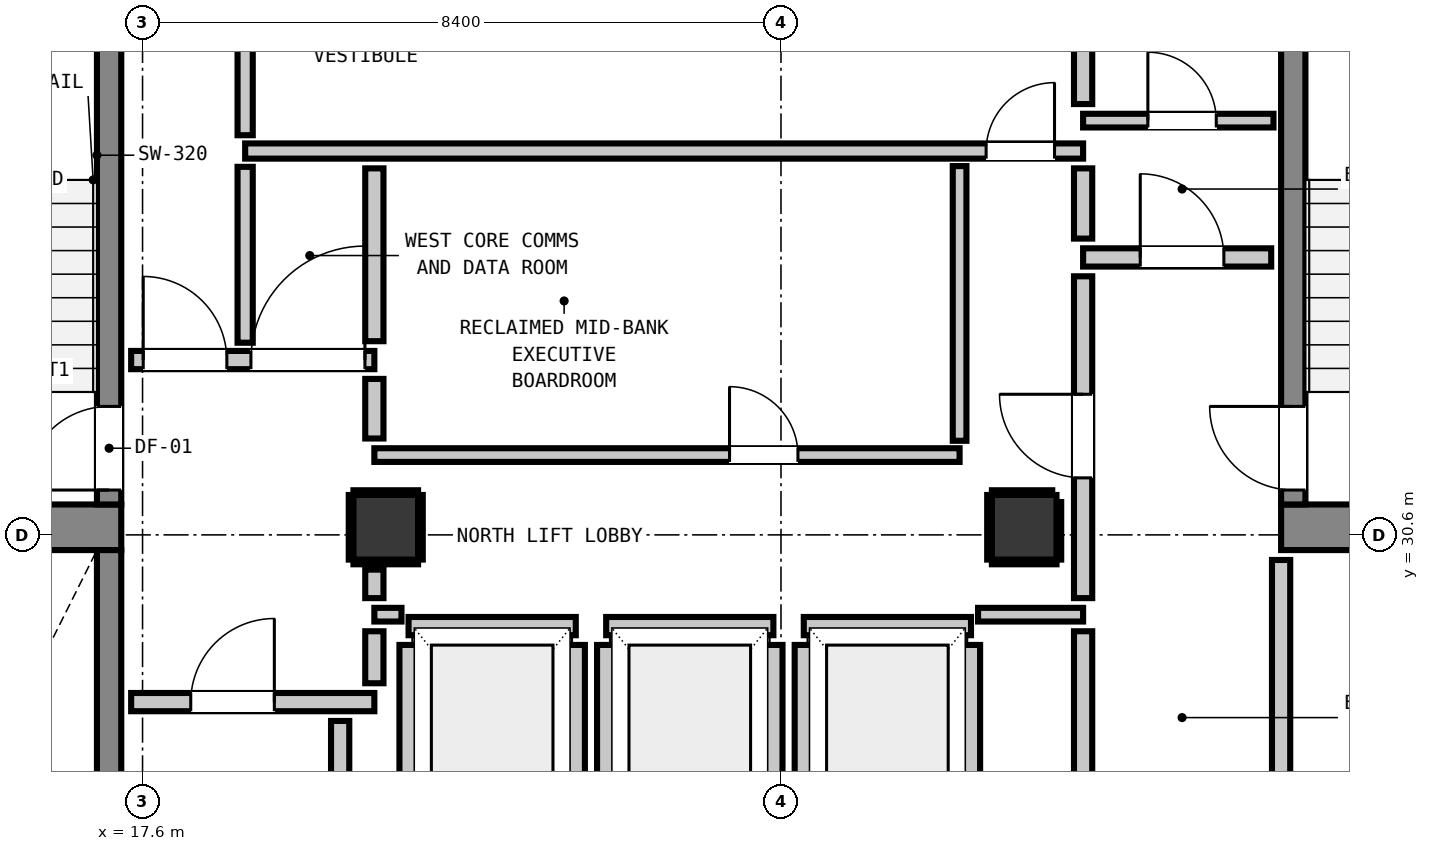
"""IFC4 building model, lengths in metres.
Left out: names, types, materials, properties, quantities, classifications, styles, units other than length and angle.
Written with IfcOpenShell. Run it as: python <this file> out.ifc"""

import sys

from ifc_helpers import new_model, si_unit, direction, frame, frame_2d, origin, origin_2d, place, context, subcontext, project, spatial, rectangle, extrude, element, fill, save


model = new_model("IFC4")
c1 = context("Model", 3, precision=1e-05, world=origin(), true_north=direction((0.0, 1.0)))
c2 = subcontext(c1, "Body", "Model", "MODEL_VIEW")
j1 = project(units=[si_unit("LENGTHUNIT", "METRE"), si_unit("PLANEANGLEUNIT", "RADIAN")], contexts=[c1])
p1 = place(None, origin())
s1 = spatial("IfcSite", under=j1, at=p1, CompositionType="ELEMENT")
p2 = place(p1, origin())
s2 = spatial("IfcBuilding", under=s1, at=p2, CompositionType="ELEMENT")
p3 = place(p2, frame((0.0, 0.0, 231.28)))
s3 = spatial("IfcBuildingStorey", under=s2, at=p3, CompositionType="ELEMENT", Elevation=231.28)
for number, where, z_axis, x_axis in (
    (1, (13.78, 30.7, 0.0), (0.0, 0.0, 1.0), (1.0, 0.0, 0.0)),
    (2, (32.58, 30.7, 0.0), (0.0, 0.0, 1.0), (1.0, 0.0, 0.0)),
):
    element("IfcWall", number, at=place(p3, frame(where, z_axis=z_axis, x_axis=x_axis)), inside=s3, PredefinedType="SHEAR", context=c2, shape_type="SweptSolid", body=[
        extrude(rectangle(XDim=3.54, YDim=0.6, at=frame_2d((1.77, 0.0))), origin(), (0.0, 0.0, 1.0), 3.32),
    ])
p4 = place(p3, frame((17.16, 31.0, 0.0), z_axis=(0.0, 0.0, 1.0), x_axis=(0.0, 1.0, 0.0)))
e3 = element("IfcWall", 3, at=p4, inside=s3, PredefinedType="SHEAR", context=c2, shape_type="SweptSolid", body=[
    extrude(rectangle(XDim=7.8, YDim=0.32, at=frame_2d((3.9, 0.0))), origin(), (0.0, 0.0, 1.0), 3.32),
])
p5 = place(p4, frame((0.19, 0.0, 0.0)))
e4 = element("IfcOpeningElement", 4, at=p5, cuts=e3, PredefinedType="OPENING", context=c2, shape_type="SweptSolid", body=[
    extrude(rectangle(XDim=1.1, YDim=2.15, at=frame_2d((0.55, 1.075))), frame((0.0, 0.17, 0.0), z_axis=(0.0, -1.0, 0.0), x_axis=(1.0, 0.0, 0.0)), (0.0, 0.0, 1.0), 0.34),
])
p6 = place(p3, frame((17.16, 22.4, 0.0), z_axis=(0.0, 0.0, 1.0), x_axis=(0.0, 1.0, 0.0)))
e5 = element("IfcWall", 5, at=p6, inside=s3, PredefinedType="SHEAR", context=c2, shape_type="SweptSolid", body=[
    extrude(rectangle(XDim=8.0, YDim=0.32, at=frame_2d((4.0, 0.0))), origin(), (0.0, 0.0, 1.0), 3.32),
])
p7 = place(p6, frame((0.39, 0.0, 0.0)))
e6 = element("IfcOpeningElement", 6, at=p7, cuts=e5, PredefinedType="OPENING", context=c2, shape_type="SweptSolid", body=[
    extrude(rectangle(XDim=1.1, YDim=2.15, at=frame_2d((0.55, 1.075))), frame((0.0, 0.17, 0.0), z_axis=(0.0, -1.0, 0.0), x_axis=(1.0, 0.0, 0.0)), (0.0, 0.0, 1.0), 0.34),
])
p8 = place(p3, frame((32.74, 31.0, 0.0), z_axis=(0.0, 0.0, 1.0), x_axis=(0.0, 1.0, 0.0)))
e7 = element("IfcWall", 7, at=p8, inside=s3, PredefinedType="SHEAR", context=c2, shape_type="SweptSolid", body=[
    extrude(rectangle(XDim=7.8, YDim=0.32, at=frame_2d((3.9, 0.0))), origin(), (0.0, 0.0, 1.0), 3.32),
])
p9 = place(p8, frame((0.19, 0.0, 0.0)))
e8 = element("IfcOpeningElement", 8, at=p9, cuts=e7, PredefinedType="OPENING", context=c2, shape_type="SweptSolid", body=[
    extrude(rectangle(XDim=1.1, YDim=2.15, at=frame_2d((0.55, 1.075))), frame((0.0, 0.17, 0.0), z_axis=(0.0, -1.0, 0.0), x_axis=(1.0, 0.0, 0.0)), (0.0, 0.0, 1.0), 0.34),
])
for number, where, z_axis, x_axis in (
    (9, (20.8, 30.7, 0.0), (0.0, 0.0, 1.0), (1.0, 0.0, 0.0)),
    (10, (29.2, 30.7, 0.0), (0.0, 0.0, 1.0), (1.0, 0.0, 0.0)),
):
    element("IfcColumn", number, at=place(p3, frame(where, z_axis=z_axis, x_axis=x_axis)), inside=s3, PredefinedType="COLUMN", context=c2, shape_type="SweptSolid", body=[
        extrude(rectangle(XDim=0.85, YDim=0.85, at=origin_2d()), origin(), (0.0, 0.0, 1.0), 3.32),
    ])
p10 = place(p3, frame((21.1, 29.4, 0.0), z_axis=(0.0, 0.0, 1.0), x_axis=(1.0, 0.0, 0.0)))
e11 = element("IfcWall", 11, at=p10, inside=s3, PredefinedType="PARTITIONING", context=c2, shape_type="SweptSolid", body=[
    extrude(rectangle(XDim=2.2, YDim=0.24, at=frame_2d((1.1, 0.0))), origin(), (0.0, 0.0, 1.0), 3.1),
])
p11 = place(p3, frame((21.1, 27.048, 0.0), z_axis=(0.0, 0.0, 1.0), x_axis=(0.0, 1.0, 0.0)))
e12 = element("IfcWall", 12, at=p11, inside=s3, PredefinedType="PARTITIONING", context=c2, shape_type="SweptSolid", body=[
    extrude(rectangle(XDim=2.104, YDim=0.24, at=frame_2d((1.052, 0.0))), origin(), (0.0, 0.0, 1.0), 2.335),
])
p12 = place(p3, frame((23.3, 27.048, 0.0), z_axis=(0.0, 0.0, 1.0), x_axis=(0.0, 1.0, 0.0)))
e13 = element("IfcWall", 13, at=p12, inside=s3, PredefinedType="PARTITIONING", context=c2, shape_type="SweptSolid", body=[
    extrude(rectangle(XDim=2.104, YDim=0.24, at=frame_2d((1.052, 0.0))), origin(), (0.0, 0.0, 1.0), 3.1),
])
p13 = place(p3, frame((23.7, 29.4, 0.0), z_axis=(0.0, 0.0, 1.0), x_axis=(1.0, 0.0, 0.0)))
e14 = element("IfcWall", 14, at=p13, inside=s3, PredefinedType="PARTITIONING", context=c2, shape_type="SweptSolid", body=[
    extrude(rectangle(XDim=2.2, YDim=0.24, at=frame_2d((1.1, 0.0))), origin(), (0.0, 0.0, 1.0), 3.1),
])
for number, where, z_axis, x_axis in (
    (15, (23.7, 27.048, 0.0), (0.0, 0.0, 1.0), (0.0, 1.0, 0.0)),
    (16, (25.9, 27.048, 0.0), (0.0, 0.0, 1.0), (0.0, 1.0, 0.0)),
):
    element("IfcWall", number, at=place(p3, frame(where, z_axis=z_axis, x_axis=x_axis)), inside=s3, PredefinedType="PARTITIONING", context=c2, shape_type="SweptSolid", body=[
        extrude(rectangle(XDim=2.104, YDim=0.24, at=frame_2d((1.052, 0.0))), origin(), (0.0, 0.0, 1.0), 3.1),
    ])
p14 = place(p3, frame((26.3, 29.4, 0.0), z_axis=(0.0, 0.0, 1.0), x_axis=(1.0, 0.0, 0.0)))
e17 = element("IfcWall", 17, at=p14, inside=s3, PredefinedType="PARTITIONING", context=c2, shape_type="SweptSolid", body=[
    extrude(rectangle(XDim=2.2, YDim=0.24, at=frame_2d((1.1, 0.0))), origin(), (0.0, 0.0, 1.0), 3.1),
])
p15 = place(p3, frame((26.3, 27.048, 0.0), z_axis=(0.0, 0.0, 1.0), x_axis=(0.0, 1.0, 0.0)))
e18 = element("IfcWall", 18, at=p15, inside=s3, PredefinedType="PARTITIONING", context=c2, shape_type="SweptSolid", body=[
    extrude(rectangle(XDim=2.104, YDim=0.24, at=frame_2d((1.052, 0.0))), origin(), (0.0, 0.0, 1.0), 3.1),
])
p16 = place(p3, frame((28.5, 27.33, 0.0), z_axis=(0.0, 0.0, 1.0), x_axis=(0.0, 1.0, 0.0)))
e19 = element("IfcWall", 19, at=p16, inside=s3, PredefinedType="PARTITIONING", context=c2, shape_type="SweptSolid", body=[
    extrude(rectangle(XDim=1.822, YDim=0.24, at=frame_2d((0.911, 0.0))), origin(), (0.0, 0.0, 1.0), 3.1),
])
p17 = place(p3, frame((17.45, 28.4, 0.0), z_axis=(0.0, 0.0, 1.0), x_axis=(1.0, 0.0, 0.0)))
e20 = element("IfcWall", 20, at=p17, inside=s3, PredefinedType="PARTITIONING", context=c2, shape_type="SweptSolid", body=[
    extrude(rectangle(XDim=3.2, YDim=0.24, at=frame_2d((1.6, 0.0))), origin(), (0.0, 0.0, 1.0), 3.1),
])
p18 = place(p17, frame((0.784, 0.0, 0.0)))
e21 = element("IfcOpeningElement", 21, at=p18, cuts=e20, PredefinedType="OPENING", context=c2, shape_type="SweptSolid", body=[
    extrude(rectangle(XDim=1.1, YDim=2.15, at=frame_2d((0.55, 1.075))), frame((0.0, 0.13, 0.0), z_axis=(0.0, -1.0, 0.0), x_axis=(1.0, 0.0, 0.0)), (0.0, 0.0, 1.0), 0.26),
])
p19 = place(p3, frame((17.45, 32.9, 0.0), z_axis=(0.0, 0.0, 1.0), x_axis=(1.0, 0.0, 0.0)))
e22 = element("IfcWall", 22, at=p19, inside=s3, PredefinedType="PARTITIONING", context=c2, shape_type="SweptSolid", body=[
    extrude(rectangle(XDim=3.2, YDim=0.24, at=frame_2d((1.6, 0.0))), origin(), (0.0, 0.0, 1.0), 3.1),
])
p20 = place(p19, frame((0.159, 0.0, 0.0)))
e23 = element("IfcOpeningElement", 23, at=p20, cuts=e22, PredefinedType="OPENING", context=c2, shape_type="SweptSolid", body=[
    extrude(rectangle(XDim=1.1, YDim=2.15, at=frame_2d((0.55, 1.075))), frame((0.0, 0.13, 0.0), z_axis=(0.0, -1.0, 0.0), x_axis=(1.0, 0.0, 0.0)), (0.0, 0.0, 1.0), 0.26),
])
p21 = place(p19, frame((1.576, 0.0, 0.0)))
e24 = element("IfcOpeningElement", 24, at=p21, cuts=e22, PredefinedType="OPENING", context=c2, shape_type="SweptSolid", body=[
    extrude(rectangle(XDim=1.5, YDim=2.15, at=frame_2d((0.75, 1.075))), frame((0.0, 0.13, 0.0), z_axis=(0.0, -1.0, 0.0), x_axis=(1.0, 0.0, 0.0)), (0.0, 0.0, 1.0), 0.26),
])
p22 = place(p3, frame((29.975, 34.25, 0.0), z_axis=(0.0, 0.0, 1.0), x_axis=(1.0, 0.0, 0.0)))
e25 = element("IfcWall", 25, at=p22, inside=s3, PredefinedType="PARTITIONING", context=c2, shape_type="SweptSolid", body=[
    extrude(rectangle(XDim=2.475, YDim=0.24, at=frame_2d((1.237, 0.0))), origin(), (0.0, 0.0, 1.0), 3.1),
])
p23 = place(p22, frame((0.752, 0.0, 0.0)))
e26 = element("IfcOpeningElement", 26, at=p23, cuts=e25, PredefinedType="OPENING", context=c2, shape_type="SweptSolid", body=[
    extrude(rectangle(XDim=1.1, YDim=2.15, at=frame_2d((0.55, 1.075))), frame((0.0, 0.13, 0.0), z_axis=(0.0, -1.0, 0.0), x_axis=(1.0, 0.0, 0.0)), (0.0, 0.0, 1.0), 0.26),
])
p24 = place(p3, frame((18.95, 35.65, 0.0), z_axis=(0.0, 0.0, 1.0), x_axis=(1.0, 0.0, 0.0)))
e27 = element("IfcWall", 27, at=p24, inside=s3, PredefinedType="PARTITIONING", context=c2, shape_type="SweptSolid", body=[
    extrude(rectangle(XDim=11.025, YDim=0.2, at=frame_2d((5.513, 0.0))), origin(), (0.0, 0.0, 1.0), 3.1),
])
p25 = place(p24, frame((9.749, 0.0, 0.0)))
e28 = element("IfcOpeningElement", 28, at=p25, cuts=e27, PredefinedType="OPENING", context=c2, shape_type="SweptSolid", body=[
    extrude(rectangle(XDim=0.9, YDim=2.1, at=frame_2d((0.45, 1.05))), frame((0.0, 0.11, 0.0), z_axis=(0.0, -1.0, 0.0), x_axis=(1.0, 0.0, 0.0)), (0.0, 0.0, 1.0), 0.22),
])
p26 = place(p3, frame((20.65, 29.55, 0.0), z_axis=(0.0, 0.0, 1.0), x_axis=(1.0, 0.0, 0.0)))
e29 = element("IfcWall", 29, at=p26, inside=s3, PredefinedType="PARTITIONING", context=c2, shape_type="SweptSolid", body=[
    extrude(rectangle(XDim=0.357, YDim=0.18, at=frame_2d((0.179, 0.0))), origin(), (0.0, 0.0, 1.0), 3.1),
])
p27 = place(p3, frame((28.593, 29.55, 0.0), z_axis=(0.0, 0.0, 1.0), x_axis=(1.0, 0.0, 0.0)))
e30 = element("IfcWall", 30, at=p27, inside=s3, PredefinedType="PARTITIONING", context=c2, shape_type="SweptSolid", body=[
    extrude(rectangle(XDim=1.382, YDim=0.18, at=frame_2d((0.691, 0.0))), origin(), (0.0, 0.0, 1.0), 3.1),
])
p28 = place(p3, frame((20.65, 31.65, 0.0), z_axis=(0.0, 0.0, 1.0), x_axis=(1.0, 0.0, 0.0)))
e31 = element("IfcWall", 31, at=p28, inside=s3, PredefinedType="PARTITIONING", context=c2, shape_type="SweptSolid", body=[
    extrude(rectangle(XDim=7.7, YDim=0.18, at=frame_2d((3.85, 0.0))), origin(), (0.0, 0.0, 1.0), 3.1),
])
p29 = place(p28, frame((4.673, 0.0, 0.0)))
e32 = element("IfcOpeningElement", 32, at=p29, cuts=e31, PredefinedType="OPENING", context=c2, shape_type="SweptSolid", body=[
    extrude(rectangle(XDim=0.9, YDim=2.1, at=frame_2d((0.45, 1.05))), frame((0.0, 0.1, 0.0), z_axis=(0.0, -1.0, 0.0), x_axis=(1.0, 0.0, 0.0)), (0.0, 0.0, 1.0), 0.2),
])
p30 = place(p3, frame((29.975, 36.05, 0.0), z_axis=(0.0, 0.0, 1.0), x_axis=(1.0, 0.0, 0.0)))
e33 = element("IfcWall", 33, at=p30, inside=s3, PredefinedType="PARTITIONING", context=c2, shape_type="SweptSolid", body=[
    extrude(rectangle(XDim=2.505, YDim=0.18, at=frame_2d((1.252, 0.0))), origin(), (0.0, 0.0, 1.0), 3.1),
])
p31 = place(p30, frame((0.852, 0.0, 0.0)))
e34 = element("IfcOpeningElement", 34, at=p31, cuts=e33, PredefinedType="OPENING", context=c2, shape_type="SweptSolid", body=[
    extrude(rectangle(XDim=0.9, YDim=2.1, at=frame_2d((0.45, 1.05))), frame((0.0, 0.1, 0.0), z_axis=(0.0, -1.0, 0.0), x_axis=(1.0, 0.0, 0.0)), (0.0, 0.0, 1.0), 0.2),
])
p32 = place(p3, frame((20.2, 21.398, 0.0), z_axis=(0.0, 0.0, 1.0), x_axis=(0.0, 1.0, 0.0)))
e35 = element("IfcWall", 35, at=p32, inside=s3, PredefinedType="PARTITIONING", context=c2, shape_type="SweptSolid", body=[
    extrude(rectangle(XDim=6.754, YDim=0.24, at=frame_2d((3.377, 0.0))), origin(), (0.0, 0.0, 1.0), 3.1),
])
p33 = place(p3, frame((20.65, 28.648, 0.0), z_axis=(0.0, 0.0, 1.0), x_axis=(0.0, 1.0, 0.0)))
e36 = element("IfcWall", 36, at=p33, inside=s3, PredefinedType="PARTITIONING", context=c2, shape_type="SweptSolid", body=[
    extrude(rectangle(XDim=0.684, YDim=0.24, at=frame_2d((0.342, 0.0))), origin(), (0.0, 0.0, 1.0), 2.335),
])
p34 = place(p3, frame((20.65, 29.768, 0.0), z_axis=(0.0, 0.0, 1.0), x_axis=(0.0, 1.0, 0.0)))
e37 = element("IfcWall", 37, at=p34, inside=s3, PredefinedType="PARTITIONING", context=c2, shape_type="SweptSolid", body=[
    extrude(rectangle(XDim=0.375, YDim=0.24, at=frame_2d((0.188, 0.0))), origin(), (0.0, 0.0, 1.0), 2.335),
])
p35 = place(p3, frame((20.65, 31.868, 0.0), z_axis=(0.0, 0.0, 1.0), x_axis=(0.0, 1.0, 0.0)))
e38 = element("IfcWall", 38, at=p35, inside=s3, PredefinedType="PARTITIONING", context=c2, shape_type="SweptSolid", body=[
    extrude(rectangle(XDim=0.784, YDim=0.24, at=frame_2d((0.392, 0.0))), origin(), (0.0, 0.0, 1.0), 2.335),
])
p36 = place(p3, frame((20.65, 33.148, 0.0), z_axis=(0.0, 0.0, 1.0), x_axis=(0.0, 1.0, 0.0)))
e39 = element("IfcWall", 39, at=p36, inside=s3, PredefinedType="PARTITIONING", context=c2, shape_type="SweptSolid", body=[
    extrude(rectangle(XDim=2.274, YDim=0.24, at=frame_2d((1.137, 0.0))), origin(), (0.0, 0.0, 1.0), 2.335),
])
p37 = place(p3, frame((29.975, 25.648, 0.0), z_axis=(0.0, 0.0, 1.0), x_axis=(0.0, 1.0, 0.0)))
e40 = element("IfcWall", 40, at=p37, inside=s3, PredefinedType="PARTITIONING", context=c2, shape_type="SweptSolid", body=[
    extrude(rectangle(XDim=3.684, YDim=0.24, at=frame_2d((1.842, 0.0))), origin(), (0.0, 0.0, 1.0), 3.1),
])
p38 = place(p3, frame((29.975, 29.768, 0.0), z_axis=(0.0, 0.0, 1.0), x_axis=(0.0, 1.0, 0.0)))
e41 = element("IfcWall", 41, at=p38, inside=s3, PredefinedType="PARTITIONING", context=c2, shape_type="SweptSolid", body=[
    extrude(rectangle(XDim=4.234, YDim=0.24, at=frame_2d((2.117, 0.0))), origin(), (0.0, 0.0, 1.0), 3.1),
])
p39 = place(p38, frame((1.582, 0.0, 0.0)))
e42 = element("IfcOpeningElement", 42, at=p39, cuts=e41, PredefinedType="OPENING", context=c2, shape_type="SweptSolid", body=[
    extrude(rectangle(XDim=1.1, YDim=2.15, at=frame_2d((0.55, 1.075))), frame((0.0, 0.13, 0.0), z_axis=(0.0, -1.0, 0.0), x_axis=(1.0, 0.0, 0.0)), (0.0, 0.0, 1.0), 0.26),
])
p40 = place(p3, frame((29.975, 34.498, 0.0), z_axis=(0.0, 0.0, 1.0), x_axis=(0.0, 1.0, 0.0)))
e43 = element("IfcWall", 43, at=p40, inside=s3, PredefinedType="PARTITIONING", context=c2, shape_type="SweptSolid", body=[
    extrude(rectangle(XDim=0.924, YDim=0.24, at=frame_2d((0.462, 0.0))), origin(), (0.0, 0.0, 1.0), 3.1),
])
p41 = place(p3, frame((29.975, 36.268, 0.0), z_axis=(0.0, 0.0, 1.0), x_axis=(0.0, 1.0, 0.0)))
e44 = element("IfcWall", 44, at=p41, inside=s3, PredefinedType="PARTITIONING", context=c2, shape_type="SweptSolid", body=[
    extrude(rectangle(XDim=2.294, YDim=0.24, at=frame_2d((1.147, 0.0))), origin(), (0.0, 0.0, 1.0), 3.1),
])
p42 = place(p3, frame((32.58, 25.648, 0.0), z_axis=(0.0, 0.0, 1.0), x_axis=(0.0, 1.0, 0.0)))
e45 = element("IfcWall", 45, at=p42, inside=s3, PredefinedType="PARTITIONING", context=c2, shape_type="SweptSolid", body=[
    extrude(rectangle(XDim=4.622, YDim=0.24, at=frame_2d((2.311, 0.0))), origin(), (0.0, 0.0, 1.0), 3.1),
])
p43 = place(p3, frame((18.95, 33.128, 0.0), z_axis=(0.0, 0.0, 1.0), x_axis=(0.0, 1.0, 0.0)))
e46 = element("IfcWall", 46, at=p43, inside=s3, PredefinedType="PARTITIONING", context=c2, shape_type="SweptSolid", body=[
    extrude(rectangle(XDim=2.314, YDim=0.2, at=frame_2d((1.157, 0.0))), origin(), (0.0, 0.0, 1.0), 3.1),
])
p44 = place(p3, frame((18.95, 35.858, 0.0), z_axis=(0.0, 0.0, 1.0), x_axis=(0.0, 1.0, 0.0)))
e47 = element("IfcWall", 47, at=p44, inside=s3, PredefinedType="PARTITIONING", context=c2, shape_type="SweptSolid", body=[
    extrude(rectangle(XDim=2.724, YDim=0.2, at=frame_2d((1.362, 0.0))), origin(), (0.0, 0.0, 1.0), 3.1),
])
p45 = place(p3, frame((28.35, 31.838, 0.0), z_axis=(0.0, 0.0, 1.0), x_axis=(0.0, 1.0, 0.0)))
e48 = element("IfcWall", 48, at=p45, inside=s3, PredefinedType="PARTITIONING", context=c2, shape_type="SweptSolid", body=[
    extrude(rectangle(XDim=3.614, YDim=0.18, at=frame_2d((1.807, 0.0))), origin(), (0.0, 0.0, 1.0), 3.1),
])
for number, where, z_axis, x_axis in (
    (49, (20.375, 30.243, 0.0), (0.0, 0.0, 1.0), (1.0, 0.0, 0.0)),
    (50, (20.375, 31.157, 0.0), (0.0, 0.0, 1.0), (1.0, 0.0, 0.0)),
    (51, (20.343, 30.275, 0.0), (0.0, 0.0, 1.0), (0.0, 1.0, 0.0)),
    (52, (21.257, 30.275, 0.0), (0.0, 0.0, 1.0), (0.0, 1.0, 0.0)),
    (53, (28.775, 30.243, 0.0), (0.0, 0.0, 1.0), (1.0, 0.0, 0.0)),
):
    element("IfcWall", number, at=place(p3, frame(where, z_axis=z_axis, x_axis=x_axis)), inside=s3, PredefinedType="PARTITIONING", context=c2, shape_type="SweptSolid", body=[
        extrude(rectangle(XDim=0.85, YDim=0.06, at=frame_2d((0.425, 0.0))), origin(), (0.0, 0.0, 1.0), 1.45),
    ])
p46 = place(p3, frame((28.775, 31.157, 0.0), z_axis=(0.0, 0.0, 1.0), x_axis=(1.0, 0.0, 0.0)))
e54 = element("IfcWall", 54, at=p46, inside=s3, PredefinedType="PARTITIONING", context=c2, shape_type="SweptSolid", body=[
    extrude(rectangle(XDim=0.794, YDim=0.06, at=frame_2d((0.397, 0.0))), origin(), (0.0, 0.0, 1.0), 1.45),
])
p47 = place(p3, frame((28.743, 30.275, 0.0), z_axis=(0.0, 0.0, 1.0), x_axis=(0.0, 1.0, 0.0)))
e55 = element("IfcWall", 55, at=p47, inside=s3, PredefinedType="PARTITIONING", context=c2, shape_type="SweptSolid", body=[
    extrude(rectangle(XDim=0.85, YDim=0.06, at=frame_2d((0.425, 0.0))), origin(), (0.0, 0.0, 1.0), 1.45),
])
p48 = place(p3, frame((29.657, 30.275, 0.0), z_axis=(0.0, 0.0, 1.0), x_axis=(0.0, 1.0, 0.0)))
e56 = element("IfcWall", 56, at=p48, inside=s3, PredefinedType="PARTITIONING", context=c2, shape_type="SweptSolid", body=[
    extrude(rectangle(XDim=0.757, YDim=0.06, at=frame_2d((0.378, 0.0))), origin(), (0.0, 0.0, 1.0), 1.45),
])
p49 = place(p5, origin())
e57 = element("IfcDoor", 57, at=p49, inside=s3, OperationType="SINGLE_SWING_LEFT", PredefinedType="DOOR", context=c2, shape_type="SweptSolid", body=[
    extrude(rectangle(XDim=1.1, YDim=2.15, at=frame_2d((0.55, 1.075))), frame((0.0, 0.025, 0.0), z_axis=(0.0, -1.0, 0.0), x_axis=(1.0, 0.0, 0.0)), (0.0, 0.0, 1.0), 0.05),
])
fill(e4, e57)
p50 = place(p9, origin())
e58 = element("IfcDoor", 58, at=p50, inside=s3, OperationType="SINGLE_SWING_RIGHT", PredefinedType="DOOR", context=c2, shape_type="SweptSolid", body=[
    extrude(rectangle(XDim=1.1, YDim=2.15, at=frame_2d((0.55, 1.075))), frame((0.0, 0.025, 0.0), z_axis=(0.0, -1.0, 0.0), x_axis=(1.0, 0.0, 0.0)), (0.0, 0.0, 1.0), 0.05),
])
fill(e8, e58)
p51 = place(p18, origin())
e59 = element("IfcDoor", 59, at=p51, inside=s3, OperationType="SINGLE_SWING_RIGHT", PredefinedType="DOOR", context=c2, shape_type="SweptSolid", body=[
    extrude(rectangle(XDim=1.1, YDim=2.15, at=frame_2d((0.55, 1.075))), frame((0.0, 0.025, 0.0), z_axis=(0.0, -1.0, 0.0), x_axis=(1.0, 0.0, 0.0)), (0.0, 0.0, 1.0), 0.05),
])
fill(e21, e59)
p52 = place(p20, origin())
e60 = element("IfcDoor", 60, at=p52, inside=s3, OperationType="SINGLE_SWING_LEFT", PredefinedType="DOOR", context=c2, shape_type="SweptSolid", body=[
    extrude(rectangle(XDim=1.1, YDim=2.15, at=frame_2d((0.55, 1.075))), frame((0.0, 0.025, 0.0), z_axis=(0.0, -1.0, 0.0), x_axis=(1.0, 0.0, 0.0)), (0.0, 0.0, 1.0), 0.05),
])
fill(e23, e60)
p53 = place(p39, origin())
e61 = element("IfcDoor", 61, at=p53, inside=s3, OperationType="SINGLE_SWING_RIGHT", PredefinedType="DOOR", context=c2, shape_type="SweptSolid", body=[
    extrude(rectangle(XDim=1.1, YDim=2.15, at=frame_2d((0.55, 1.075))), frame((0.0, 0.025, 0.0), z_axis=(0.0, -1.0, 0.0), x_axis=(1.0, 0.0, 0.0)), (0.0, 0.0, 1.0), 0.05),
])
fill(e42, e61)
p54 = place(p23, origin())
e62 = element("IfcDoor", 62, at=p54, inside=s3, OperationType="SINGLE_SWING_LEFT", PredefinedType="DOOR", context=c2, shape_type="SweptSolid", body=[
    extrude(rectangle(XDim=1.1, YDim=2.15, at=frame_2d((0.55, 1.075))), frame((0.0, 0.025, 0.0), z_axis=(0.0, -1.0, 0.0), x_axis=(1.0, 0.0, 0.0)), (0.0, 0.0, 1.0), 0.05),
])
fill(e26, e62)
p55 = place(p21, origin())
e63 = element("IfcDoor", 63, at=p55, inside=s3, OperationType="SINGLE_SWING_RIGHT", PredefinedType="DOOR", context=c2, shape_type="SweptSolid", body=[
    extrude(rectangle(XDim=1.5, YDim=2.15, at=frame_2d((0.75, 1.075))), frame((0.0, 0.025, 0.0), z_axis=(0.0, -1.0, 0.0), x_axis=(1.0, 0.0, 0.0)), (0.0, 0.0, 1.0), 0.05),
])
fill(e24, e63)
p56 = place(p31, origin())
e64 = element("IfcDoor", 64, at=p56, inside=s3, OperationType="SINGLE_SWING_LEFT", PredefinedType="DOOR", context=c2, shape_type="SweptSolid", body=[
    extrude(rectangle(XDim=0.9, YDim=2.1, at=frame_2d((0.45, 1.05))), frame((0.0, 0.025, 0.0), z_axis=(0.0, -1.0, 0.0), x_axis=(1.0, 0.0, 0.0)), (0.0, 0.0, 1.0), 0.05),
])
fill(e34, e64)
p57 = place(p25, origin())
e65 = element("IfcDoor", 65, at=p57, inside=s3, OperationType="SINGLE_SWING_RIGHT", PredefinedType="DOOR", context=c2, shape_type="SweptSolid", body=[
    extrude(rectangle(XDim=0.9, YDim=2.1, at=frame_2d((0.45, 1.05))), frame((0.0, 0.025, 0.0), z_axis=(0.0, -1.0, 0.0), x_axis=(1.0, 0.0, 0.0)), (0.0, 0.0, 1.0), 0.05),
])
fill(e28, e65)
p58 = place(p29, origin())
e66 = element("IfcDoor", 66, at=p58, inside=s3, OperationType="SINGLE_SWING_LEFT", PredefinedType="DOOR", context=c2, shape_type="SweptSolid", body=[
    extrude(rectangle(XDim=0.9, YDim=2.1, at=frame_2d((0.45, 1.05))), frame((0.0, 0.025, 0.0), z_axis=(0.0, -1.0, 0.0), x_axis=(1.0, 0.0, 0.0)), (0.0, 0.0, 1.0), 0.05),
])
fill(e32, e66)
save(model, sys.argv[1])
